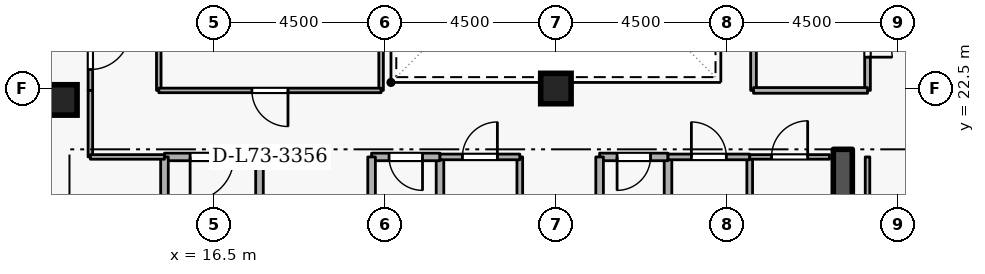
"""IFC4 building model, lengths in metres.
Left out: names, types, materials, properties, quantities, classifications, styles, units other than length and angle.
Written with IfcOpenShell. Run it as: python <this file> out.ifc"""

import sys

from ifc_helpers import new_model, si_unit, direction, frame, frame_2d, origin, origin_2d, place, context, subcontext, project, spatial, rectangle, extrude, element, fill, save


model = new_model("IFC4")
c1 = context("Model", 3, precision=1e-05, world=origin(), true_north=direction((0.0, 1.0)))
c2 = subcontext(c1, "Body", "Model", "MODEL_VIEW")
j1 = project(units=[si_unit("LENGTHUNIT", "METRE"), si_unit("PLANEANGLEUNIT", "RADIAN")], contexts=[c1])
p1 = place(None, origin())
s1 = spatial("IfcSite", under=j1, at=p1, CompositionType="ELEMENT")
p2 = place(p1, origin())
s2 = spatial("IfcBuilding", under=s1, at=p2, CompositionType="ELEMENT")
p3 = place(p2, frame((0.0, 0.0, 272.7)))
s3 = spatial("IfcBuildingStorey", under=s2, at=p3, CompositionType="ELEMENT", Elevation=272.7)
p4 = place(p3, frame((33.05, 15.1, 0.0), z_axis=(0.0, 0.0, 1.0), x_axis=(0.0, 1.0, 0.0)))
e1 = element("IfcWall", 1, at=p4, inside=s3, PredefinedType="SHEAR", context=c2, shape_type="SweptSolid", body=[
    extrude(rectangle(XDim=5.8, YDim=0.5, at=frame_2d((2.9, 0.0))), origin(), (0.0, 0.0, 1.0), 3.6),
])
for number, where, z_axis, x_axis in (
    (2, (12.5, 22.2, 0.0), (0.0, 0.0, 1.0), (1.0, 0.0, 0.0)),
    (3, (25.5, 22.5, 0.0), (0.0, 0.0, 1.0), (1.0, 0.0, 0.0)),
):
    element("IfcColumn", number, at=place(p3, frame(where, z_axis=z_axis, x_axis=x_axis)), inside=s3, PredefinedType="COLUMN", context=c2, shape_type="SweptSolid", body=[
        extrude(rectangle(XDim=0.8, YDim=0.8, at=origin_2d()), origin(), (0.0, 0.0, 1.0), 3.6),
    ])
p5 = place(p3, frame((17.7, 18.4, 0.0), z_axis=(0.0, 0.0, 1.0), x_axis=(0.0, 1.0, 0.0)))
e4 = element("IfcWall", 4, at=p5, inside=s3, PredefinedType="STANDARD", context=c2, shape_type="SweptSolid", body=[
    extrude(rectangle(XDim=2.3, YDim=0.2, at=frame_2d((1.15, 0.0))), origin(), (0.0, 0.0, 1.0), 2.545),
])
p6 = place(p3, frame((17.7, 20.7, 0.0), z_axis=(0.0, 0.0, 1.0), x_axis=(-1.0, 0.0, 0.0)))
e5 = element("IfcWall", 5, at=p6, inside=s3, PredefinedType="STANDARD", context=c2, shape_type="SweptSolid", body=[
    extrude(rectangle(XDim=2.5, YDim=0.2, at=frame_2d((1.25, 0.0))), origin(), (0.0, 0.0, 1.0), 3.34),
])
p7 = place(p6, frame((0.675, 0.0, 0.0)))
e6 = element("IfcOpeningElement", 6, at=p7, cuts=e5, PredefinedType="OPENING", context=c2, shape_type="SweptSolid", body=[
    extrude(rectangle(XDim=1.15, YDim=2.1, at=frame_2d((0.575, 1.05))), frame((0.0, 0.11, 0.0), z_axis=(0.0, -1.0, 0.0), x_axis=(1.0, 0.0, 0.0)), (0.0, 0.0, 1.0), 0.22),
])
p8 = place(p3, frame((15.2, 20.7, 0.0), z_axis=(0.0, 0.0, 1.0), x_axis=(0.0, -1.0, 0.0)))
e7 = element("IfcWall", 7, at=p8, inside=s3, PredefinedType="STANDARD", context=c2, shape_type="SweptSolid", body=[
    extrude(rectangle(XDim=5.7, YDim=0.2, at=frame_2d((2.85, 0.0))), origin(), (0.0, 0.0, 1.0), 3.34),
])
p9 = place(p3, frame((28.45, 18.65, 0.0), z_axis=(0.0, 0.0, 1.0), x_axis=(0.0, 1.0, 0.0)))
e8 = element("IfcWall", 8, at=p9, inside=s3, PredefinedType="STANDARD", context=c2, shape_type="SweptSolid", body=[
    extrude(rectangle(XDim=2.05, YDim=0.2, at=frame_2d((1.025, 0.0))), origin(), (0.0, 0.0, 1.0), 3.34),
])
p10 = place(p3, frame((28.45, 20.7, 0.0), z_axis=(0.0, 0.0, 1.0), x_axis=(-1.0, 0.0, 0.0)))
e9 = element("IfcWall", 9, at=p10, inside=s3, PredefinedType="STANDARD", context=c2, shape_type="SweptSolid", body=[
    extrude(rectangle(XDim=1.8, YDim=0.2, at=frame_2d((0.9, 0.0))), origin(), (0.0, 0.0, 1.0), 3.34),
])
p11 = place(p10, frame((0.46, 0.0, 0.0)))
e10 = element("IfcOpeningElement", 10, at=p11, cuts=e9, PredefinedType="OPENING", context=c2, shape_type="SweptSolid", body=[
    extrude(rectangle(XDim=0.88, YDim=2.04, at=frame_2d((0.44, 1.02))), frame((0.0, 0.11, 0.0), z_axis=(0.0, -1.0, 0.0), x_axis=(1.0, 0.0, 0.0)), (0.0, 0.0, 1.0), 0.22),
])
for number, where, z_axis, x_axis in (
    (11, (26.65, 20.7, 0.0), (0.0, 0.0, 1.0), (0.0, -1.0, 0.0)),
    (12, (22.45, 18.65, 0.0), (0.0, 0.0, 1.0), (0.0, 1.0, 0.0)),
):
    element("IfcWall", number, at=place(p3, frame(where, z_axis=z_axis, x_axis=x_axis)), inside=s3, PredefinedType="STANDARD", context=c2, shape_type="SweptSolid", body=[
        extrude(rectangle(XDim=2.05, YDim=0.2, at=frame_2d((1.025, 0.0))), origin(), (0.0, 0.0, 1.0), 3.34),
    ])
p12 = place(p3, frame((22.45, 20.7, 0.0), z_axis=(0.0, 0.0, 1.0), x_axis=(-1.0, 0.0, 0.0)))
e13 = element("IfcWall", 13, at=p12, inside=s3, PredefinedType="STANDARD", context=c2, shape_type="SweptSolid", body=[
    extrude(rectangle(XDim=1.8, YDim=0.2, at=frame_2d((0.9, 0.0))), origin(), (0.0, 0.0, 1.0), 3.34),
])
p13 = place(p12, frame((0.46, 0.0, 0.0)))
e14 = element("IfcOpeningElement", 14, at=p13, cuts=e13, PredefinedType="OPENING", context=c2, shape_type="SweptSolid", body=[
    extrude(rectangle(XDim=0.88, YDim=2.04, at=frame_2d((0.44, 1.02))), frame((0.0, 0.11, 0.0), z_axis=(0.0, -1.0, 0.0), x_axis=(1.0, 0.0, 0.0)), (0.0, 0.0, 1.0), 0.22),
])
p14 = place(p3, frame((20.65, 20.7, 0.0), z_axis=(0.0, 0.0, 1.0), x_axis=(0.0, -1.0, 0.0)))
e15 = element("IfcWall", 15, at=p14, inside=s3, PredefinedType="STANDARD", context=c2, shape_type="SweptSolid", body=[
    extrude(rectangle(XDim=2.05, YDim=0.2, at=frame_2d((1.025, 0.0))), origin(), (0.0, 0.0, 1.0), 3.34),
])
p15 = place(p3, frame((24.55, 20.7, 0.0), z_axis=(0.0, 0.0, 1.0), x_axis=(0.0, -1.0, 0.0)))
e16 = element("IfcWall", 16, at=p15, inside=s3, PredefinedType="PARTITIONING", context=c2, shape_type="SweptSolid", body=[
    extrude(rectangle(XDim=2.05, YDim=0.15, at=frame_2d((1.025, 0.0))), origin(), (0.0, 0.0, 1.0), 3.34),
])
p16 = place(p3, frame((22.45, 20.7, 0.0), z_axis=(0.0, 0.0, 1.0), x_axis=(1.0, 0.0, 0.0)))
e17 = element("IfcWall", 17, at=p16, inside=s3, PredefinedType="PARTITIONING", context=c2, shape_type="SweptSolid", body=[
    extrude(rectangle(XDim=2.1, YDim=0.15, at=frame_2d((1.05, 0.0))), origin(), (0.0, 0.0, 1.0), 3.34),
])
p17 = place(p16, frame((0.59, 0.0, 0.0)))
e18 = element("IfcOpeningElement", 18, at=p17, cuts=e17, PredefinedType="OPENING", context=c2, shape_type="SweptSolid", body=[
    extrude(rectangle(XDim=0.92, YDim=2.08, at=frame_2d((0.46, 1.04))), frame((0.0, 0.085, 0.0), z_axis=(0.0, -1.0, 0.0), x_axis=(1.0, 0.0, 0.0)), (0.0, 0.0, 1.0), 0.17),
])
p18 = place(p3, frame((30.6, 20.7, 0.0), z_axis=(0.0, 0.0, 1.0), x_axis=(0.0, -1.0, 0.0)))
e19 = element("IfcWall", 19, at=p18, inside=s3, PredefinedType="PARTITIONING", context=c2, shape_type="SweptSolid", body=[
    extrude(rectangle(XDim=2.05, YDim=0.15, at=frame_2d((1.025, 0.0))), origin(), (0.0, 0.0, 1.0), 3.34),
])
p19 = place(p3, frame((28.45, 20.7, 0.0), z_axis=(0.0, 0.0, 1.0), x_axis=(1.0, 0.0, 0.0)))
e20 = element("IfcWall", 20, at=p19, inside=s3, PredefinedType="PARTITIONING", context=c2, shape_type="SweptSolid", body=[
    extrude(rectangle(XDim=2.15, YDim=0.15, at=frame_2d((1.075, 0.0))), origin(), (0.0, 0.0, 1.0), 3.34),
])
p20 = place(p19, frame((0.615, 0.0, 0.0)))
e21 = element("IfcOpeningElement", 21, at=p20, cuts=e20, PredefinedType="OPENING", context=c2, shape_type="SweptSolid", body=[
    extrude(rectangle(XDim=0.92, YDim=2.08, at=frame_2d((0.46, 1.04))), frame((0.0, 0.085, 0.0), z_axis=(0.0, -1.0, 0.0), x_axis=(1.0, 0.0, 0.0)), (0.0, 0.0, 1.0), 0.17),
])
p21 = place(p3, frame((30.6, 20.7, 0.0), z_axis=(0.0, 0.0, 1.0), x_axis=(1.0, 0.0, 0.0)))
e22 = element("IfcWall", 22, at=p21, inside=s3, PredefinedType="PARTITIONING", context=c2, shape_type="SweptSolid", body=[
    extrude(rectangle(XDim=2.1, YDim=0.12, at=frame_2d((1.05, 0.0))), origin(), (0.0, 0.0, 1.0), 3.34),
])
p22 = place(p21, frame((0.575, 0.0, 0.0)))
e23 = element("IfcOpeningElement", 23, at=p22, cuts=e22, PredefinedType="OPENING", context=c2, shape_type="SweptSolid", body=[
    extrude(rectangle(XDim=0.95, YDim=2.1, at=frame_2d((0.475, 1.05))), frame((0.0, 0.07, 0.0), z_axis=(0.0, -1.0, 0.0), x_axis=(1.0, 0.0, 0.0)), (0.0, 0.0, 1.0), 0.14),
])
p23 = place(p3, frame((33.7, 20.7, 0.0), z_axis=(0.0, 0.0, 1.0), x_axis=(0.0, -1.0, 0.0)))
e24 = element("IfcWall", 24, at=p23, inside=s3, PredefinedType="PARTITIONING", context=c2, shape_type="SweptSolid", body=[
    extrude(rectangle(XDim=5.9, YDim=0.12, at=frame_2d((2.95, 0.0))), origin(), (0.0, 0.0, 1.0), 3.34),
])
p24 = place(p3, frame((13.25, 24.6, 0.0), z_axis=(0.0, 0.0, 1.0), x_axis=(0.0, -1.0, 0.0)))
e25 = element("IfcWall", 25, at=p24, inside=s3, PredefinedType="PARTITIONING", context=c2, shape_type="SweptSolid", body=[
    extrude(rectangle(XDim=2.15, YDim=0.12, at=frame_2d((1.075, 0.0))), origin(), (0.0, 0.0, 1.0), 3.34),
])
p25 = place(p24, frame((0.55, 0.0, 0.0)))
e26 = element("IfcOpeningElement", 26, at=p25, cuts=e25, PredefinedType="OPENING", context=c2, shape_type="SweptSolid", body=[
    extrude(rectangle(XDim=1.05, YDim=2.1, at=frame_2d((0.525, 1.05))), frame((0.0, 0.07, 0.0), z_axis=(0.0, -1.0, 0.0), x_axis=(1.0, 0.0, 0.0)), (0.0, 0.0, 1.0), 0.14),
])
p26 = place(p3, frame((13.25, 22.45, 0.0), z_axis=(0.0, 0.0, 1.0), x_axis=(0.0, -1.0, 0.0)))
e27 = element("IfcWall", 27, at=p26, inside=s3, PredefinedType="PARTITIONING", context=c2, shape_type="SweptSolid", body=[
    extrude(rectangle(XDim=1.75, YDim=0.12, at=frame_2d((0.875, 0.0))), origin(), (0.0, 0.0, 1.0), 3.34),
])
p27 = place(p3, frame((13.25, 20.7, 0.0), z_axis=(0.0, 0.0, 1.0), x_axis=(1.0, 0.0, 0.0)))
e28 = element("IfcWall", 28, at=p27, inside=s3, PredefinedType="PARTITIONING", context=c2, shape_type="SweptSolid", body=[
    extrude(rectangle(XDim=1.95, YDim=0.12, at=frame_2d((0.975, 0.0))), origin(), (0.0, 0.0, 1.0), 3.34),
])
for number, where, z_axis, x_axis in (
    (29, (15.05, 22.45, 0.0), (0.0, 0.0, 1.0), (0.0, 1.0, 0.0)),
    (30, (20.9, 26.2, 0.0), (0.0, 0.0, 1.0), (0.0, -1.0, 0.0)),
):
    element("IfcWall", number, at=place(p3, frame(where, z_axis=z_axis, x_axis=x_axis)), inside=s3, PredefinedType="PARTITIONING", context=c2, shape_type="SweptSolid", body=[
        extrude(rectangle(XDim=3.75, YDim=0.12, at=frame_2d((1.875, 0.0))), origin(), (0.0, 0.0, 1.0), 3.34),
    ])
p28 = place(p3, frame((20.9, 22.45, 0.0), z_axis=(0.0, 0.0, 1.0), x_axis=(-1.0, 0.0, 0.0)))
e31 = element("IfcWall", 31, at=p28, inside=s3, PredefinedType="PARTITIONING", context=c2, shape_type="SweptSolid", body=[
    extrude(rectangle(XDim=5.85, YDim=0.12, at=frame_2d((2.925, 0.0))), origin(), (0.0, 0.0, 1.0), 3.34),
])
p29 = place(p28, frame((2.45, 0.0, 0.0)))
e32 = element("IfcOpeningElement", 32, at=p29, cuts=e31, PredefinedType="OPENING", context=c2, shape_type="SweptSolid", body=[
    extrude(rectangle(XDim=0.95, YDim=2.1, at=frame_2d((0.475, 1.05))), frame((0.0, 0.07, 0.0), z_axis=(0.0, -1.0, 0.0), x_axis=(1.0, 0.0, 0.0)), (0.0, 0.0, 1.0), 0.14),
])
p30 = place(p3, frame((30.7, 22.45, 0.0), z_axis=(0.0, 0.0, 1.0), x_axis=(0.0, 1.0, 0.0)))
e33 = element("IfcWall", 33, at=p30, inside=s3, PredefinedType="PARTITIONING", context=c2, shape_type="SweptSolid", body=[
    extrude(rectangle(XDim=3.05, YDim=0.15, at=frame_2d((1.525, 0.0))), origin(), (0.0, 0.0, 1.0), 3.34),
])
p31 = place(p3, frame((33.7, 25.5, 0.0), z_axis=(0.0, 0.0, 1.0), x_axis=(0.0, -1.0, 0.0)))
e34 = element("IfcWall", 34, at=p31, inside=s3, PredefinedType="PARTITIONING", context=c2, shape_type="SweptSolid", body=[
    extrude(rectangle(XDim=3.05, YDim=0.15, at=frame_2d((1.525, 0.0))), origin(), (0.0, 0.0, 1.0), 3.34),
])
p32 = place(p31, frame((0.875, 0.0, 0.0)))
e35 = element("IfcOpeningElement", 35, at=p32, cuts=e34, PredefinedType="OPENING", context=c2, shape_type="SweptSolid", body=[
    extrude(rectangle(XDim=1.3, YDim=2.12, at=frame_2d((0.65, 1.06))), frame((0.0, 0.085, 0.0), z_axis=(0.0, -1.0, 0.0), x_axis=(1.0, 0.0, 0.0)), (0.0, 0.0, 1.0), 0.17),
])
p33 = place(p3, frame((33.7, 22.45, 0.0), z_axis=(0.0, 0.0, 1.0), x_axis=(-1.0, 0.0, 0.0)))
e36 = element("IfcWall", 36, at=p33, inside=s3, PredefinedType="PARTITIONING", context=c2, shape_type="SweptSolid", body=[
    extrude(rectangle(XDim=3.0, YDim=0.15, at=frame_2d((1.5, 0.0))), origin(), (0.0, 0.0, 1.0), 3.34),
])
p34 = place(p7, origin())
e37 = element("IfcDoor", 37, at=p34, inside=s3, OperationType="SINGLE_SWING_RIGHT", PredefinedType="DOOR", context=c2, shape_type="SweptSolid", body=[
    extrude(rectangle(XDim=1.15, YDim=2.1, at=frame_2d((0.575, 1.05))), frame((0.0, 0.025, 0.0), z_axis=(0.0, -1.0, 0.0), x_axis=(1.0, 0.0, 0.0)), (0.0, 0.0, 1.0), 0.05),
])
fill(e6, e37)
p35 = place(p11, origin())
e38 = element("IfcDoor", 38, at=p35, inside=s3, OperationType="SINGLE_SWING_RIGHT", PredefinedType="DOOR", context=c2, shape_type="SweptSolid", body=[
    extrude(rectangle(XDim=0.88, YDim=2.04, at=frame_2d((0.44, 1.02))), frame((0.0, 0.025, 0.0), z_axis=(0.0, -1.0, 0.0), x_axis=(1.0, 0.0, 0.0)), (0.0, 0.0, 1.0), 0.05),
])
fill(e10, e38)
p36 = place(p13, origin())
e39 = element("IfcDoor", 39, at=p36, inside=s3, OperationType="SINGLE_SWING_LEFT", PredefinedType="DOOR", context=c2, shape_type="SweptSolid", body=[
    extrude(rectangle(XDim=0.88, YDim=2.04, at=frame_2d((0.44, 1.02))), frame((0.0, 0.025, 0.0), z_axis=(0.0, -1.0, 0.0), x_axis=(1.0, 0.0, 0.0)), (0.0, 0.0, 1.0), 0.05),
])
fill(e14, e39)
p37 = place(p17, origin())
e40 = element("IfcDoor", 40, at=p37, inside=s3, OperationType="SINGLE_SWING_RIGHT", PredefinedType="DOOR", context=c2, shape_type="SweptSolid", body=[
    extrude(rectangle(XDim=0.92, YDim=2.08, at=frame_2d((0.46, 1.04))), frame((0.0, 0.025, 0.0), z_axis=(0.0, -1.0, 0.0), x_axis=(1.0, 0.0, 0.0)), (0.0, 0.0, 1.0), 0.05),
])
fill(e18, e40)
p38 = place(p20, origin())
e41 = element("IfcDoor", 41, at=p38, inside=s3, OperationType="SINGLE_SWING_LEFT", PredefinedType="DOOR", context=c2, shape_type="SweptSolid", body=[
    extrude(rectangle(XDim=0.92, YDim=2.08, at=frame_2d((0.46, 1.04))), frame((0.0, 0.025, 0.0), z_axis=(0.0, -1.0, 0.0), x_axis=(1.0, 0.0, 0.0)), (0.0, 0.0, 1.0), 0.05),
])
fill(e21, e41)
p39 = place(p22, origin())
e42 = element("IfcDoor", 42, at=p39, inside=s3, OperationType="SINGLE_SWING_RIGHT", PredefinedType="DOOR", context=c2, shape_type="SweptSolid", body=[
    extrude(rectangle(XDim=0.95, YDim=2.1, at=frame_2d((0.475, 1.05))), frame((0.0, 0.025, 0.0), z_axis=(0.0, -1.0, 0.0), x_axis=(1.0, 0.0, 0.0)), (0.0, 0.0, 1.0), 0.05),
])
fill(e23, e42)
p40 = place(p25, origin())
e43 = element("IfcDoor", 43, at=p40, inside=s3, OperationType="SINGLE_SWING_LEFT", PredefinedType="DOOR", context=c2, shape_type="SweptSolid", body=[
    extrude(rectangle(XDim=1.05, YDim=2.1, at=frame_2d((0.525, 1.05))), frame((0.0, 0.025, 0.0), z_axis=(0.0, -1.0, 0.0), x_axis=(1.0, 0.0, 0.0)), (0.0, 0.0, 1.0), 0.05),
])
fill(e26, e43)
p41 = place(p29, origin())
e44 = element("IfcDoor", 44, at=p41, inside=s3, OperationType="SINGLE_SWING_LEFT", PredefinedType="DOOR", context=c2, shape_type="SweptSolid", body=[
    extrude(rectangle(XDim=0.95, YDim=2.1, at=frame_2d((0.475, 1.05))), frame((0.0, 0.025, 0.0), z_axis=(0.0, -1.0, 0.0), x_axis=(1.0, 0.0, 0.0)), (0.0, 0.0, 1.0), 0.05),
])
fill(e32, e44)
p42 = place(p32, origin())
e45 = element("IfcDoor", 45, at=p42, inside=s3, OperationType="DOUBLE_DOOR_SINGLE_SWING", PredefinedType="DOOR", context=c2, shape_type="SweptSolid", body=[
    extrude(rectangle(XDim=1.3, YDim=2.12, at=frame_2d((0.65, 1.06))), frame((0.0, 0.025, 0.0), z_axis=(0.0, -1.0, 0.0), x_axis=(1.0, 0.0, 0.0)), (0.0, 0.0, 1.0), 0.05),
])
fill(e35, e45)
save(model, sys.argv[1])
